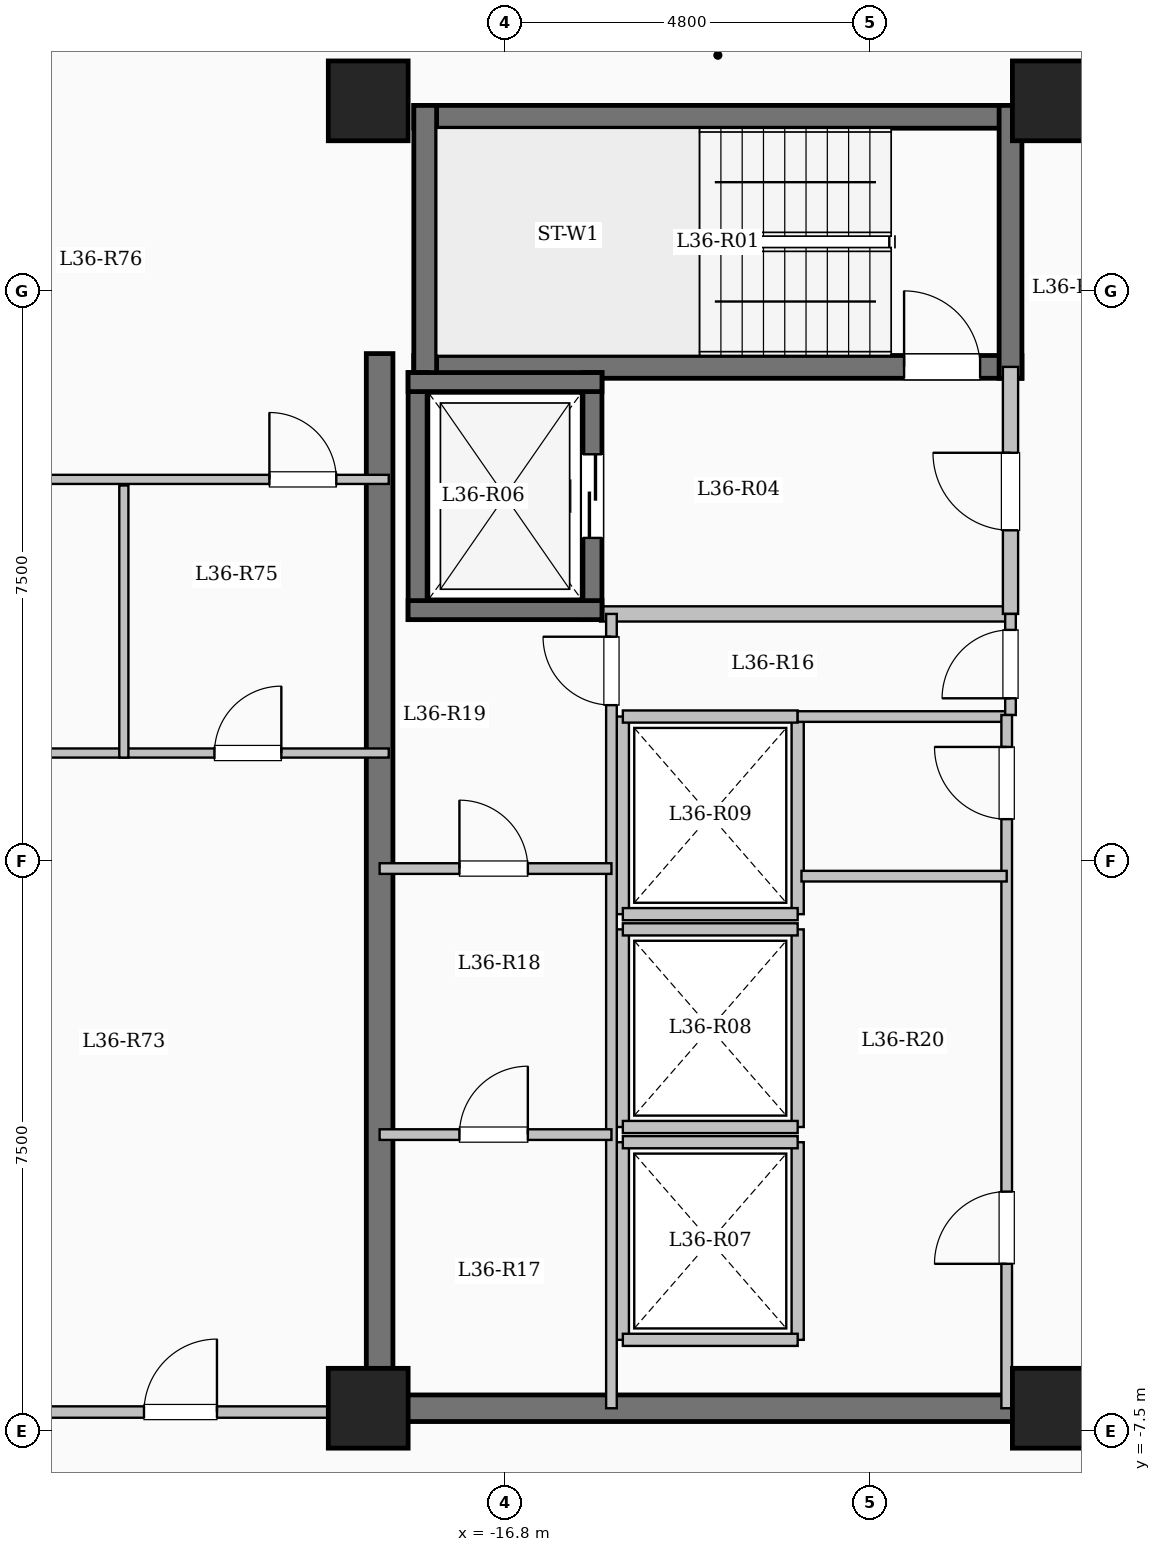
"""IFC4 building model, lengths in metres.
Left out: names, types, materials, properties, quantities, classifications, styles, units other than length and angle.
Written with IfcOpenShell. Run it as: python <this file> out.ifc"""

import sys

from ifc_helpers import new_model, si_unit, direction, frame, frame_2d, origin, origin_2d, place, context, subcontext, project, spatial, rectangle, extrude, element, fill, save


model = new_model("IFC4")
c1 = context("Model", 3, precision=1e-05, world=origin(), true_north=direction((0.0, 1.0)))
c2 = subcontext(c1, "Body", "Model", "MODEL_VIEW")
j1 = project(units=[si_unit("LENGTHUNIT", "METRE"), si_unit("PLANEANGLEUNIT", "RADIAN")], contexts=[c1])
p1 = place(None, origin())
s1 = spatial("IfcSite", under=j1, at=p1, CompositionType="ELEMENT")
p2 = place(p1, origin())
s2 = spatial("IfcBuilding", under=s1, at=p2, CompositionType="ELEMENT")
p3 = place(p2, frame((0.0, 0.0, 135.95)))
s3 = spatial("IfcBuildingStorey", under=s2, at=p3, CompositionType="ELEMENT", Elevation=135.95)
for number, where, z_axis, x_axis in (
    (1, (-9.6, -7.2, 0.0), (0.0, 0.0, 1.0), (1.0, 0.0, 0.0)),
    (2, (-9.6, 10.0, 0.0), (0.0, 0.0, 1.0), (1.0, 0.0, 0.0)),
    (3, (-18.6, -7.2, 0.0), (0.0, 0.0, 1.0), (1.0, 0.0, 0.0)),
    (4, (-18.6, 10.0, 0.0), (0.0, 0.0, 1.0), (1.0, 0.0, 0.0)),
):
    element("IfcColumn", number, at=place(p3, frame(where, z_axis=z_axis, x_axis=x_axis)), inside=s3, PredefinedType="COLUMN", context=c2, shape_type="SweptSolid", body=[
        extrude(rectangle(XDim=1.05, YDim=1.05, at=origin_2d()), origin(), (0.0, 0.0, 1.0), 3.35),
    ])
p4 = place(p3, frame((-18.0, 9.79, 0.0), z_axis=(0.0, 0.0, 1.0), x_axis=(1.0, 0.0, 0.0)))
e5 = element("IfcWall", 5, at=p4, inside=s3, PredefinedType="SHEAR", context=c2, shape_type="SweptSolid", body=[
    extrude(rectangle(XDim=8.0, YDim=0.3, at=frame_2d((4.0, 0.0))), origin(), (0.0, 0.0, 1.0), 3.35),
])
p5 = place(p3, frame((-18.0, 6.5, 0.0), z_axis=(0.0, 0.0, 1.0), x_axis=(1.0, 0.0, 0.0)))
e6 = element("IfcWall", 6, at=p5, inside=s3, PredefinedType="SHEAR", context=c2, shape_type="SweptSolid", body=[
    extrude(rectangle(XDim=8.0, YDim=0.3, at=frame_2d((4.0, 0.0))), origin(), (0.0, 0.0, 1.0), 3.35),
])
p6 = place(p5, frame((6.45, 0.0, 0.0)))
e7 = element("IfcOpeningElement", 7, at=p6, cuts=e6, PredefinedType="OPENING", context=c2, shape_type="SweptSolid", body=[
    extrude(rectangle(XDim=1.0, YDim=2.15, at=frame_2d((0.5, 1.075))), frame((0.0, 0.16, 0.0), z_axis=(0.0, -1.0, 0.0), x_axis=(1.0, 0.0, 0.0)), (0.0, 0.0, 1.0), 0.32),
])
for number, where, z_axis, x_axis in (
    (8, (-17.85, 6.35, 0.0), (0.0, 0.0, 1.0), (0.0, 1.0, 0.0)),
    (9, (-10.15, 6.35, 0.0), (0.0, 0.0, 1.0), (0.0, 1.0, 0.0)),
):
    element("IfcWall", number, at=place(p3, frame(where, z_axis=z_axis, x_axis=x_axis)), inside=s3, PredefinedType="SHEAR", context=c2, shape_type="SweptSolid", body=[
        extrude(rectangle(XDim=3.59, YDim=0.3, at=frame_2d((1.795, 0.0))), origin(), (0.0, 0.0, 1.0), 3.35),
    ])
p7 = place(p3, frame((-15.55, 3.25, 0.0), z_axis=(0.0, 0.0, 1.0), x_axis=(1.0, 0.0, 0.0)))
e10 = element("IfcWall", 10, at=p7, inside=s3, PredefinedType="SOLIDWALL", context=c2, shape_type="SweptSolid", body=[
    extrude(rectangle(XDim=5.4, YDim=0.2, at=frame_2d((2.7, 0.0))), origin(), (0.0, 0.0, 1.0), 3.1),
])
p8 = place(p3, frame((-10.15, 3.25, 0.0), z_axis=(0.0, 0.0, 1.0), x_axis=(0.0, 1.0, 0.0)))
e11 = element("IfcWall", 11, at=p8, inside=s3, PredefinedType="SOLIDWALL", context=c2, shape_type="SweptSolid", body=[
    extrude(rectangle(XDim=3.25, YDim=0.2, at=frame_2d((1.625, 0.0))), origin(), (0.0, 0.0, 1.0), 3.1),
])
p9 = place(p8, frame((1.1, 0.0, 0.0)))
e12 = element("IfcOpeningElement", 12, at=p9, cuts=e11, PredefinedType="OPENING", context=c2, shape_type="SweptSolid", body=[
    extrude(rectangle(XDim=1.02, YDim=2.15, at=frame_2d((0.51, 1.075))), frame((0.0, 0.11, 0.0), z_axis=(0.0, -1.0, 0.0), x_axis=(1.0, 0.0, 0.0)), (0.0, 0.0, 1.0), 0.22),
])
p10 = place(p3, frame((-17.95, 3.175, 0.0), z_axis=(0.0, 0.0, 1.0), x_axis=(0.0, 1.0, 0.0)))
e13 = element("IfcWall", 13, at=p10, inside=s3, PredefinedType="SHEAR", context=c2, shape_type="SweptSolid", body=[
    extrude(rectangle(XDim=3.25, YDim=0.25, at=frame_2d((1.625, 0.0))), origin(), (0.0, 0.0, 1.0), 3.35),
])
p11 = place(p3, frame((-15.65, 3.175, 0.0), z_axis=(0.0, 0.0, 1.0), x_axis=(0.0, 1.0, 0.0)))
e14 = element("IfcWall", 14, at=p11, inside=s3, PredefinedType="SHEAR", context=c2, shape_type="SweptSolid", body=[
    extrude(rectangle(XDim=3.25, YDim=0.25, at=frame_2d((1.625, 0.0))), origin(), (0.0, 0.0, 1.0), 3.35),
])
p12 = place(p11, frame((1.075, 0.0, 0.0)))
e15 = element("IfcOpeningElement", 15, at=p12, cuts=e14, PredefinedType="OPENING", context=c2, shape_type="SweptSolid", body=[
    extrude(rectangle(XDim=1.1, YDim=2.15, at=frame_2d((0.55, 1.075))), frame((0.0, 0.135, 0.0), z_axis=(0.0, -1.0, 0.0), x_axis=(1.0, 0.0, 0.0)), (0.0, 0.0, 1.0), 0.27),
])
for number, where, z_axis, x_axis in (
    (16, (-18.075, 3.3, 0.0), (0.0, 0.0, 1.0), (1.0, 0.0, 0.0)),
    (17, (-18.075, 6.3, 0.0), (0.0, 0.0, 1.0), (1.0, 0.0, 0.0)),
):
    element("IfcWall", number, at=place(p3, frame(where, z_axis=z_axis, x_axis=x_axis)), inside=s3, PredefinedType="SHEAR", context=c2, shape_type="SweptSolid", body=[
        extrude(rectangle(XDim=2.55, YDim=0.25, at=frame_2d((1.275, 0.0))), origin(), (0.0, 0.0, 1.0), 3.35),
    ])
for number, where, z_axis, x_axis in (
    (18, (-15.25, -6.3, 0.0), (0.0, 0.0, 1.0), (0.0, 1.0, 0.0)),
    (19, (-12.95, -6.3, 0.0), (0.0, 0.0, 1.0), (0.0, 1.0, 0.0)),
):
    element("IfcWall", number, at=place(p3, frame(where, z_axis=z_axis, x_axis=x_axis)), inside=s3, PredefinedType="SOLIDWALL", context=c2, shape_type="SweptSolid", body=[
        extrude(rectangle(XDim=2.6, YDim=0.16, at=frame_2d((1.3, 0.0))), origin(), (0.0, 0.0, 1.0), 3.1),
    ])
for number, where, z_axis, x_axis in (
    (20, (-15.25, -6.3, 0.0), (0.0, 0.0, 1.0), (1.0, 0.0, 0.0)),
    (21, (-15.25, -3.7, 0.0), (0.0, 0.0, 1.0), (1.0, 0.0, 0.0)),
):
    element("IfcWall", number, at=place(p3, frame(where, z_axis=z_axis, x_axis=x_axis)), inside=s3, PredefinedType="SOLIDWALL", context=c2, shape_type="SweptSolid", body=[
        extrude(rectangle(XDim=2.3, YDim=0.16, at=frame_2d((1.15, 0.0))), origin(), (0.0, 0.0, 1.0), 3.1),
    ])
for number, where, z_axis, x_axis in (
    (22, (-15.25, -3.5, 0.0), (0.0, 0.0, 1.0), (0.0, 1.0, 0.0)),
    (23, (-12.95, -3.5, 0.0), (0.0, 0.0, 1.0), (0.0, 1.0, 0.0)),
):
    element("IfcWall", number, at=place(p3, frame(where, z_axis=z_axis, x_axis=x_axis)), inside=s3, PredefinedType="SOLIDWALL", context=c2, shape_type="SweptSolid", body=[
        extrude(rectangle(XDim=2.6, YDim=0.16, at=frame_2d((1.3, 0.0))), origin(), (0.0, 0.0, 1.0), 3.1),
    ])
for number, where, z_axis, x_axis in (
    (24, (-15.25, -3.5, 0.0), (0.0, 0.0, 1.0), (1.0, 0.0, 0.0)),
    (25, (-15.25, -0.9, 0.0), (0.0, 0.0, 1.0), (1.0, 0.0, 0.0)),
):
    element("IfcWall", number, at=place(p3, frame(where, z_axis=z_axis, x_axis=x_axis)), inside=s3, PredefinedType="SOLIDWALL", context=c2, shape_type="SweptSolid", body=[
        extrude(rectangle(XDim=2.3, YDim=0.16, at=frame_2d((1.15, 0.0))), origin(), (0.0, 0.0, 1.0), 3.1),
    ])
for number, where, z_axis, x_axis in (
    (26, (-15.25, -0.7, 0.0), (0.0, 0.0, 1.0), (0.0, 1.0, 0.0)),
    (27, (-12.95, -0.7, 0.0), (0.0, 0.0, 1.0), (0.0, 1.0, 0.0)),
):
    element("IfcWall", number, at=place(p3, frame(where, z_axis=z_axis, x_axis=x_axis)), inside=s3, PredefinedType="SOLIDWALL", context=c2, shape_type="SweptSolid", body=[
        extrude(rectangle(XDim=2.6, YDim=0.16, at=frame_2d((1.3, 0.0))), origin(), (0.0, 0.0, 1.0), 3.1),
    ])
for number, where, z_axis, x_axis in (
    (28, (-15.25, -0.7, 0.0), (0.0, 0.0, 1.0), (1.0, 0.0, 0.0)),
    (29, (-15.25, 1.9, 0.0), (0.0, 0.0, 1.0), (1.0, 0.0, 0.0)),
):
    element("IfcWall", number, at=place(p3, frame(where, z_axis=z_axis, x_axis=x_axis)), inside=s3, PredefinedType="SOLIDWALL", context=c2, shape_type="SweptSolid", body=[
        extrude(rectangle(XDim=2.3, YDim=0.16, at=frame_2d((1.15, 0.0))), origin(), (0.0, 0.0, 1.0), 3.1),
    ])
p13 = place(p3, frame((-18.45, -7.375, 0.0), z_axis=(0.0, 0.0, 1.0), x_axis=(0.0, 1.0, 0.0)))
e30 = element("IfcWall", 30, at=p13, inside=s3, PredefinedType="SHEAR", context=c2, shape_type="SweptSolid", body=[
    extrude(rectangle(XDim=14.05, YDim=0.35, at=frame_2d((7.025, 0.0))), origin(), (0.0, 0.0, 1.0), 3.35),
])
p14 = place(p3, frame((-18.625, -7.2, 0.0), z_axis=(0.0, 0.0, 1.0), x_axis=(1.0, 0.0, 0.0)))
e31 = element("IfcWall", 31, at=p14, inside=s3, PredefinedType="SHEAR", context=c2, shape_type="SweptSolid", body=[
    extrude(rectangle(XDim=8.55, YDim=0.35, at=frame_2d((4.275, 0.0))), origin(), (0.0, 0.0, 1.0), 3.35),
])
p15 = place(p3, frame((-12.95, 1.9, 0.0), z_axis=(0.0, 0.0, 1.0), x_axis=(1.0, 0.0, 0.0)))
e32 = element("IfcWall", 32, at=p15, inside=s3, PredefinedType="PARTITIONING", context=c2, shape_type="SweptSolid", body=[
    extrude(rectangle(XDim=2.8, YDim=0.14, at=frame_2d((1.4, 0.0))), origin(), (0.0, 0.0, 1.0), 3.1),
])
p16 = place(p3, frame((-10.15, 1.92, 0.0), z_axis=(0.0, 0.0, 1.0), x_axis=(0.0, 1.0, 0.0)))
e33 = element("IfcWall", 33, at=p16, inside=s3, PredefinedType="PARTITIONING", context=c2, shape_type="SweptSolid", body=[
    extrude(rectangle(XDim=1.33, YDim=0.14, at=frame_2d((0.665, 0.0))), origin(), (0.0, 0.0, 1.0), 3.1),
])
p17 = place(p16, frame((0.22, 0.0, 0.0)))
e34 = element("IfcOpeningElement", 34, at=p17, cuts=e33, PredefinedType="OPENING", context=c2, shape_type="SweptSolid", body=[
    extrude(rectangle(XDim=0.9, YDim=2.08, at=frame_2d((0.45, 1.04))), frame((0.0, 0.08, 0.0), z_axis=(0.0, -1.0, 0.0), x_axis=(1.0, 0.0, 0.0)), (0.0, 0.0, 1.0), 0.16),
])
p18 = place(p3, frame((-15.4, -7.2, 0.0), z_axis=(0.0, 0.0, 1.0), x_axis=(0.0, 1.0, 0.0)))
e35 = element("IfcWall", 35, at=p18, inside=s3, PredefinedType="PARTITIONING", context=c2, shape_type="SweptSolid", body=[
    extrude(rectangle(XDim=10.45, YDim=0.14, at=frame_2d((5.225, 0.0))), origin(), (0.0, 0.0, 1.0), 3.1),
])
p19 = place(p18, frame((9.25, 0.0, 0.0)))
e36 = element("IfcOpeningElement", 36, at=p19, cuts=e35, PredefinedType="OPENING", context=c2, shape_type="SweptSolid", body=[
    extrude(rectangle(XDim=0.9, YDim=2.08, at=frame_2d((0.45, 1.04))), frame((0.0, 0.08, 0.0), z_axis=(0.0, -1.0, 0.0), x_axis=(1.0, 0.0, 0.0)), (0.0, 0.0, 1.0), 0.16),
])
p20 = place(p3, frame((-18.45, -3.6, 0.0), z_axis=(0.0, 0.0, 1.0), x_axis=(1.0, 0.0, 0.0)))
e37 = element("IfcWall", 37, at=p20, inside=s3, PredefinedType="PARTITIONING", context=c2, shape_type="SweptSolid", body=[
    extrude(rectangle(XDim=3.05, YDim=0.14, at=frame_2d((1.525, 0.0))), origin(), (0.0, 0.0, 1.0), 3.1),
])
p21 = place(p20, frame((1.05, 0.0, 0.0)))
e38 = element("IfcOpeningElement", 38, at=p21, cuts=e37, PredefinedType="OPENING", context=c2, shape_type="SweptSolid", body=[
    extrude(rectangle(XDim=0.9, YDim=2.08, at=frame_2d((0.45, 1.04))), frame((0.0, 0.08, 0.0), z_axis=(0.0, -1.0, 0.0), x_axis=(1.0, 0.0, 0.0)), (0.0, 0.0, 1.0), 0.16),
])
p22 = place(p3, frame((-18.45, -0.1, 0.0), z_axis=(0.0, 0.0, 1.0), x_axis=(1.0, 0.0, 0.0)))
e39 = element("IfcWall", 39, at=p22, inside=s3, PredefinedType="PARTITIONING", context=c2, shape_type="SweptSolid", body=[
    extrude(rectangle(XDim=3.05, YDim=0.14, at=frame_2d((1.525, 0.0))), origin(), (0.0, 0.0, 1.0), 3.1),
])
p23 = place(p22, frame((1.05, 0.0, 0.0)))
e40 = element("IfcOpeningElement", 40, at=p23, cuts=e39, PredefinedType="OPENING", context=c2, shape_type="SweptSolid", body=[
    extrude(rectangle(XDim=0.9, YDim=2.08, at=frame_2d((0.45, 1.04))), frame((0.0, 0.08, 0.0), z_axis=(0.0, -1.0, 0.0), x_axis=(1.0, 0.0, 0.0)), (0.0, 0.0, 1.0), 0.16),
])
p24 = place(p3, frame((-10.2, -7.2, 0.0), z_axis=(0.0, 0.0, 1.0), x_axis=(0.0, 1.0, 0.0)))
e41 = element("IfcWall", 41, at=p24, inside=s3, PredefinedType="PARTITIONING", context=c2, shape_type="SweptSolid", body=[
    extrude(rectangle(XDim=9.12, YDim=0.14, at=frame_2d((4.56, 0.0))), origin(), (0.0, 0.0, 1.0), 3.1),
])
p25 = place(p24, frame((1.9, 0.0, 0.0)))
e42 = element("IfcOpeningElement", 42, at=p25, cuts=e41, PredefinedType="OPENING", context=c2, shape_type="SweptSolid", body=[
    extrude(rectangle(XDim=0.95, YDim=2.12, at=frame_2d((0.475, 1.06))), frame((0.0, 0.08, 0.0), z_axis=(0.0, -1.0, 0.0), x_axis=(1.0, 0.0, 0.0)), (0.0, 0.0, 1.0), 0.16),
])
p26 = place(p24, frame((7.75, 0.0, 0.0)))
e43 = element("IfcOpeningElement", 43, at=p26, cuts=e41, PredefinedType="OPENING", context=c2, shape_type="SweptSolid", body=[
    extrude(rectangle(XDim=0.95, YDim=2.12, at=frame_2d((0.475, 1.06))), frame((0.0, 0.08, 0.0), z_axis=(0.0, -1.0, 0.0), x_axis=(1.0, 0.0, 0.0)), (0.0, 0.0, 1.0), 0.16),
])
p27 = place(p3, frame((-12.9, -0.2, 0.0), z_axis=(0.0, 0.0, 1.0), x_axis=(1.0, 0.0, 0.0)))
e44 = element("IfcWall", 44, at=p27, inside=s3, PredefinedType="PARTITIONING", context=c2, shape_type="SweptSolid", body=[
    extrude(rectangle(XDim=2.7, YDim=0.14, at=frame_2d((1.35, 0.0))), origin(), (0.0, 0.0, 1.0), 3.1),
])
p28 = place(p3, frame((-25.08, -7.25, 0.0), z_axis=(0.0, 0.0, 1.0), x_axis=(1.0, 0.0, 0.0)))
e45 = element("IfcWall", 45, at=p28, inside=s3, PredefinedType="PARTITIONING", context=c2, shape_type="SweptSolid", body=[
    extrude(rectangle(XDim=6.63, YDim=0.15, at=frame_2d((3.315, 0.0))), origin(), (0.0, 0.0, 1.0), 3.1),
])
p29 = place(p28, frame((3.53, 0.0, 0.0)))
e46 = element("IfcOpeningElement", 46, at=p29, cuts=e45, PredefinedType="OPENING", context=c2, shape_type="SweptSolid", body=[
    extrude(rectangle(XDim=0.96, YDim=2.15, at=frame_2d((0.48, 1.075))), frame((0.0, 0.085, 0.0), z_axis=(0.0, -1.0, 0.0), x_axis=(1.0, 0.0, 0.0)), (0.0, 0.0, 1.0), 0.17),
])
p30 = place(p3, frame((-25.2, 1.42, 0.0), z_axis=(0.0, 0.0, 1.0), x_axis=(1.0, 0.0, 0.0)))
e47 = element("IfcWall", 47, at=p30, inside=s3, PredefinedType="PARTITIONING", context=c2, shape_type="SweptSolid", body=[
    extrude(rectangle(XDim=6.87, YDim=0.12, at=frame_2d((3.435, 0.0))), origin(), (0.0, 0.0, 1.0), 3.1),
])
p31 = place(p30, frame((1.312, 0.0, 0.0)))
e48 = element("IfcOpeningElement", 48, at=p31, cuts=e47, PredefinedType="OPENING", context=c2, shape_type="SweptSolid", body=[
    extrude(rectangle(XDim=0.88, YDim=2.1, at=frame_2d((0.44, 1.05))), frame((0.0, 0.07, 0.0), z_axis=(0.0, -1.0, 0.0), x_axis=(1.0, 0.0, 0.0)), (0.0, 0.0, 1.0), 0.14),
])
p32 = place(p30, frame((4.577, 0.0, 0.0)))
e49 = element("IfcOpeningElement", 49, at=p32, cuts=e47, PredefinedType="OPENING", context=c2, shape_type="SweptSolid", body=[
    extrude(rectangle(XDim=0.88, YDim=2.1, at=frame_2d((0.44, 1.05))), frame((0.0, 0.07, 0.0), z_axis=(0.0, -1.0, 0.0), x_axis=(1.0, 0.0, 0.0)), (0.0, 0.0, 1.0), 0.14),
])
p33 = place(p3, frame((-25.2, 5.02, 0.0), z_axis=(0.0, 0.0, 1.0), x_axis=(1.0, 0.0, 0.0)))
e50 = element("IfcWall", 50, at=p33, inside=s3, PredefinedType="PARTITIONING", context=c2, shape_type="SweptSolid", body=[
    extrude(rectangle(XDim=6.87, YDim=0.12, at=frame_2d((3.435, 0.0))), origin(), (0.0, 0.0, 1.0), 3.1),
])
p34 = place(p33, frame((5.3, 0.0, 0.0)))
e51 = element("IfcOpeningElement", 51, at=p34, cuts=e50, PredefinedType="OPENING", context=c2, shape_type="SweptSolid", body=[
    extrude(rectangle(XDim=0.88, YDim=2.1, at=frame_2d((0.44, 1.05))), frame((0.0, 0.07, 0.0), z_axis=(0.0, -1.0, 0.0), x_axis=(1.0, 0.0, 0.0)), (0.0, 0.0, 1.0), 0.14),
])
p35 = place(p3, frame((-21.815, 1.36, 0.0), z_axis=(0.0, 0.0, 1.0), x_axis=(0.0, 1.0, 0.0)))
e52 = element("IfcWall", 52, at=p35, inside=s3, PredefinedType="PARTITIONING", context=c2, shape_type="SweptSolid", body=[
    extrude(rectangle(XDim=3.58, YDim=0.12, at=frame_2d((1.79, 0.0))), origin(), (0.0, 0.0, 1.0), 3.1),
])
p36 = place(p6, origin())
e53 = element("IfcDoor", 53, at=p36, inside=s3, OperationType="SINGLE_SWING_LEFT", PredefinedType="DOOR", context=c2, shape_type="SweptSolid", body=[
    extrude(rectangle(XDim=1.0, YDim=2.15, at=frame_2d((0.5, 1.075))), frame((0.0, 0.025, 0.0), z_axis=(0.0, -1.0, 0.0), x_axis=(1.0, 0.0, 0.0)), (0.0, 0.0, 1.0), 0.05),
])
fill(e7, e53)
p37 = place(p9, origin())
e54 = element("IfcDoor", 54, at=p37, inside=s3, OperationType="SINGLE_SWING_RIGHT", PredefinedType="DOOR", context=c2, shape_type="SweptSolid", body=[
    extrude(rectangle(XDim=1.02, YDim=2.15, at=frame_2d((0.51, 1.075))), frame((0.0, 0.025, 0.0), z_axis=(0.0, -1.0, 0.0), x_axis=(1.0, 0.0, 0.0)), (0.0, 0.0, 1.0), 0.05),
])
fill(e12, e54)
p38 = place(p12, origin())
e55 = element("IfcDoor", 55, at=p38, inside=s3, OperationType="SLIDING_TO_LEFT", PredefinedType="DOOR", context=c2, shape_type="SweptSolid", body=[
    extrude(rectangle(XDim=1.1, YDim=2.15, at=frame_2d((0.55, 1.075))), frame((0.0, 0.025, 0.0), z_axis=(0.0, -1.0, 0.0), x_axis=(1.0, 0.0, 0.0)), (0.0, 0.0, 1.0), 0.05),
])
fill(e15, e55)
p39 = place(p17, origin())
e56 = element("IfcDoor", 56, at=p39, inside=s3, OperationType="SINGLE_SWING_LEFT", PredefinedType="DOOR", context=c2, shape_type="SweptSolid", body=[
    extrude(rectangle(XDim=0.9, YDim=2.08, at=frame_2d((0.45, 1.04))), frame((0.0, 0.025, 0.0), z_axis=(0.0, -1.0, 0.0), x_axis=(1.0, 0.0, 0.0)), (0.0, 0.0, 1.0), 0.05),
])
fill(e34, e56)
p40 = place(p19, origin())
e57 = element("IfcDoor", 57, at=p40, inside=s3, OperationType="SINGLE_SWING_RIGHT", PredefinedType="DOOR", context=c2, shape_type="SweptSolid", body=[
    extrude(rectangle(XDim=0.9, YDim=2.08, at=frame_2d((0.45, 1.04))), frame((0.0, 0.025, 0.0), z_axis=(0.0, -1.0, 0.0), x_axis=(1.0, 0.0, 0.0)), (0.0, 0.0, 1.0), 0.05),
])
fill(e36, e57)
p41 = place(p23, origin())
e58 = element("IfcDoor", 58, at=p41, inside=s3, OperationType="SINGLE_SWING_LEFT", PredefinedType="DOOR", context=c2, shape_type="SweptSolid", body=[
    extrude(rectangle(XDim=0.9, YDim=2.08, at=frame_2d((0.45, 1.04))), frame((0.0, 0.025, 0.0), z_axis=(0.0, -1.0, 0.0), x_axis=(1.0, 0.0, 0.0)), (0.0, 0.0, 1.0), 0.05),
])
fill(e40, e58)
p42 = place(p21, origin())
e59 = element("IfcDoor", 59, at=p42, inside=s3, OperationType="SINGLE_SWING_RIGHT", PredefinedType="DOOR", context=c2, shape_type="SweptSolid", body=[
    extrude(rectangle(XDim=0.9, YDim=2.08, at=frame_2d((0.45, 1.04))), frame((0.0, 0.025, 0.0), z_axis=(0.0, -1.0, 0.0), x_axis=(1.0, 0.0, 0.0)), (0.0, 0.0, 1.0), 0.05),
])
fill(e38, e59)
p43 = place(p25, origin())
e60 = element("IfcDoor", 60, at=p43, inside=s3, OperationType="SINGLE_SWING_LEFT", PredefinedType="DOOR", context=c2, shape_type="SweptSolid", body=[
    extrude(rectangle(XDim=0.95, YDim=2.12, at=frame_2d((0.475, 1.06))), frame((0.0, 0.025, 0.0), z_axis=(0.0, -1.0, 0.0), x_axis=(1.0, 0.0, 0.0)), (0.0, 0.0, 1.0), 0.05),
])
fill(e42, e60)
p44 = place(p26, origin())
e61 = element("IfcDoor", 61, at=p44, inside=s3, OperationType="SINGLE_SWING_RIGHT", PredefinedType="DOOR", context=c2, shape_type="SweptSolid", body=[
    extrude(rectangle(XDim=0.95, YDim=2.12, at=frame_2d((0.475, 1.06))), frame((0.0, 0.025, 0.0), z_axis=(0.0, -1.0, 0.0), x_axis=(1.0, 0.0, 0.0)), (0.0, 0.0, 1.0), 0.05),
])
fill(e43, e61)
p45 = place(p29, origin())
e62 = element("IfcDoor", 62, at=p45, inside=s3, OperationType="SINGLE_SWING_RIGHT", PredefinedType="DOOR", context=c2, shape_type="SweptSolid", body=[
    extrude(rectangle(XDim=0.96, YDim=2.15, at=frame_2d((0.48, 1.075))), frame((0.0, 0.025, 0.0), z_axis=(0.0, -1.0, 0.0), x_axis=(1.0, 0.0, 0.0)), (0.0, 0.0, 1.0), 0.05),
])
fill(e46, e62)
p46 = place(p32, origin())
e63 = element("IfcDoor", 63, at=p46, inside=s3, OperationType="SINGLE_SWING_RIGHT", PredefinedType="DOOR", context=c2, shape_type="SweptSolid", body=[
    extrude(rectangle(XDim=0.88, YDim=2.1, at=frame_2d((0.44, 1.05))), frame((0.0, 0.025, 0.0), z_axis=(0.0, -1.0, 0.0), x_axis=(1.0, 0.0, 0.0)), (0.0, 0.0, 1.0), 0.05),
])
fill(e49, e63)
p47 = place(p34, origin())
e64 = element("IfcDoor", 64, at=p47, inside=s3, OperationType="SINGLE_SWING_LEFT", PredefinedType="DOOR", context=c2, shape_type="SweptSolid", body=[
    extrude(rectangle(XDim=0.88, YDim=2.1, at=frame_2d((0.44, 1.05))), frame((0.0, 0.025, 0.0), z_axis=(0.0, -1.0, 0.0), x_axis=(1.0, 0.0, 0.0)), (0.0, 0.0, 1.0), 0.05),
])
fill(e51, e64)
save(model, sys.argv[1])
